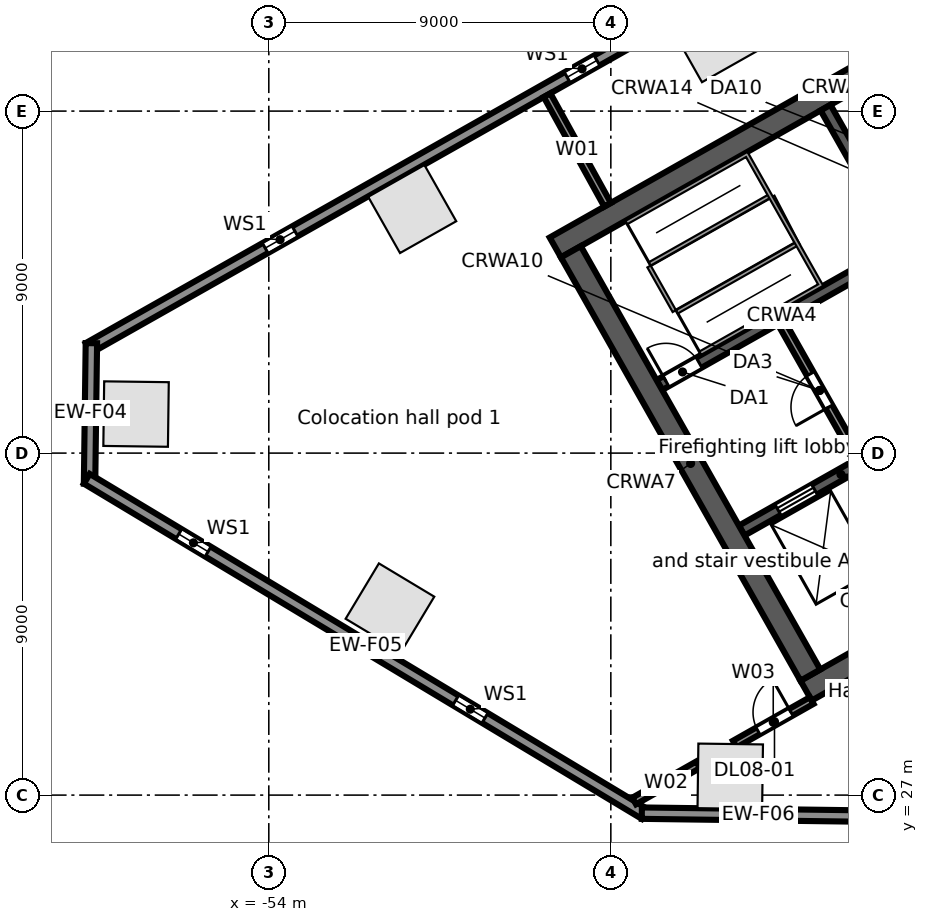
"""IFC4 building model, lengths in metres.
Left out: names, types, materials, properties, quantities, classifications, styles, units other than length and angle.
Written with IfcOpenShell. Run it as: python <this file> out.ifc"""

import sys

from ifc_helpers import new_model, si_unit, direction, frame, frame_2d, origin, origin_2d, place, context, subcontext, project, spatial, rectangle, extrude, element, fill, save


model = new_model("IFC4")
c1 = context("Model", 3, precision=1e-05, world=origin(), true_north=direction((0.0, 1.0)))
c2 = subcontext(c1, "Body", "Model", "MODEL_VIEW")
j1 = project(units=[si_unit("LENGTHUNIT", "METRE"), si_unit("PLANEANGLEUNIT", "RADIAN")], contexts=[c1])
p1 = place(None, origin())
s1 = spatial("IfcSite", under=j1, at=p1, CompositionType="ELEMENT")
p2 = place(p1, origin())
s2 = spatial("IfcBuilding", under=s1, at=p2, CompositionType="ELEMENT")
p3 = place(p2, frame((0.0, 0.0, 51.5)))
s3 = spatial("IfcBuildingStorey", under=s2, at=p3, CompositionType="ELEMENT", Elevation=51.5)
for number, where, z_axis, x_axis in (
    (1, (-42.28, 46.919, 0.0), (0.0, 0.0, 1.0), (-0.87, -0.492, 0.0)),
    (2, (-50.226, 42.423, 0.0), (0.0, 0.0, 1.0), (-0.87, -0.492, 0.0)),
    (3, (-57.493, 37.027, 0.0), (0.0, 0.0, 1.0), (-0.013, -1.0, 0.0)),
    (4, (-50.812, 31.931, 0.0), (0.0, 0.0, 1.0), (0.857, -0.515, 0.0)),
    (5, (-41.858, 27.495, 0.0), (0.0, 0.0, 1.0), (1.0, -0.013, 0.0)),
):
    element("IfcColumn", number, at=place(p3, frame(where, z_axis=z_axis, x_axis=x_axis)), inside=s3, PredefinedType="COLUMN", context=c2, shape_type="SweptSolid", body=[
        extrude(rectangle(XDim=1.7, YDim=1.7, at=origin_2d()), origin(), (0.0, 0.0, 1.0), 5.0),
    ])
p4 = place(p3, frame((-58.745, 38.764, 0.0), z_axis=(0.0, 0.0, 1.0), x_axis=(0.870355811726, 0.492423355453, 0.0)))
e6 = element("IfcWall", 6, at=p4, inside=s3, PredefinedType="STANDARD", context=c2, shape_type="SweptSolid", body=[
    extrude(rectangle(XDim=64.025, YDim=0.3, at=frame_2d((32.013, 0.0))), origin(), (0.0, 0.0, 1.0), 4.68),
])
p5 = place(p4, frame((60.122, 0.0, 0.6)))
e7 = element("IfcOpeningElement", 7, at=p5, cuts=e6, PredefinedType="OPENING", context=c2, shape_type="SweptSolid", body=[
    extrude(rectangle(XDim=0.9, YDim=3.2, at=frame_2d((0.45, 1.6))), frame((0.0, 0.16, 0.0), z_axis=(0.0, -1.0, 0.0), x_axis=(1.0, 0.0, 0.0)), (0.0, 0.0, 1.0), 0.32),
])
p6 = place(p4, frame((50.992, 0.0, 0.6)))
e8 = element("IfcOpeningElement", 8, at=p6, cuts=e6, PredefinedType="OPENING", context=c2, shape_type="SweptSolid", body=[
    extrude(rectangle(XDim=0.9, YDim=3.2, at=frame_2d((0.45, 1.6))), frame((0.0, 0.16, 0.0), z_axis=(0.0, -1.0, 0.0), x_axis=(1.0, 0.0, 0.0)), (0.0, 0.0, 1.0), 0.32),
])
p7 = place(p4, frame((41.862, 0.0, 0.6)))
e9 = element("IfcOpeningElement", 9, at=p7, cuts=e6, PredefinedType="OPENING", context=c2, shape_type="SweptSolid", body=[
    extrude(rectangle(XDim=0.9, YDim=3.2, at=frame_2d((0.45, 1.6))), frame((0.0, 0.16, 0.0), z_axis=(0.0, -1.0, 0.0), x_axis=(1.0, 0.0, 0.0)), (0.0, 0.0, 1.0), 0.32),
])
p8 = place(p4, frame((32.732, 0.0, 0.6)))
e10 = element("IfcOpeningElement", 10, at=p8, cuts=e6, PredefinedType="OPENING", context=c2, shape_type="SweptSolid", body=[
    extrude(rectangle(XDim=0.9, YDim=3.2, at=frame_2d((0.45, 1.6))), frame((0.0, 0.16, 0.0), z_axis=(0.0, -1.0, 0.0), x_axis=(1.0, 0.0, 0.0)), (0.0, 0.0, 1.0), 0.32),
])
p9 = place(p4, frame((23.602, 0.0, 0.6)))
e11 = element("IfcOpeningElement", 11, at=p9, cuts=e6, PredefinedType="OPENING", context=c2, shape_type="SweptSolid", body=[
    extrude(rectangle(XDim=0.9, YDim=3.2, at=frame_2d((0.45, 1.6))), frame((0.0, 0.16, 0.0), z_axis=(0.0, -1.0, 0.0), x_axis=(1.0, 0.0, 0.0)), (0.0, 0.0, 1.0), 0.32),
])
p10 = place(p4, frame((14.472, 0.0, 0.6)))
e12 = element("IfcOpeningElement", 12, at=p10, cuts=e6, PredefinedType="OPENING", context=c2, shape_type="SweptSolid", body=[
    extrude(rectangle(XDim=0.9, YDim=3.2, at=frame_2d((0.45, 1.6))), frame((0.0, 0.16, 0.0), z_axis=(0.0, -1.0, 0.0), x_axis=(1.0, 0.0, 0.0)), (0.0, 0.0, 1.0), 0.32),
])
p11 = place(p4, frame((5.342, 0.0, 0.6)))
e13 = element("IfcOpeningElement", 13, at=p11, cuts=e6, PredefinedType="OPENING", context=c2, shape_type="SweptSolid", body=[
    extrude(rectangle(XDim=0.9, YDim=3.2, at=frame_2d((0.45, 1.6))), frame((0.0, 0.16, 0.0), z_axis=(0.0, -1.0, 0.0), x_axis=(1.0, 0.0, 0.0)), (0.0, 0.0, 1.0), 0.32),
])
p12 = place(p3, frame((-58.717, 35.194, 0.0), z_axis=(0.0, 0.0, 1.0), x_axis=(0.013069053407, 0.999914596275, 0.0)))
e14 = element("IfcWall", 14, at=p12, inside=s3, PredefinedType="STANDARD", context=c2, shape_type="SweptSolid", body=[
    extrude(rectangle(XDim=3.699, YDim=0.3, at=frame_2d((1.849, 0.0))), origin(), (0.0, 0.0, 1.0), 4.68),
])
p13 = place(p3, frame((-44.109, 26.504, 0.0), z_axis=(0.0, 0.0, 1.0), x_axis=(-0.857169502585, 0.515034410344, 0.0)))
e15 = element("IfcWall", 15, at=p13, inside=s3, PredefinedType="STANDARD", context=c2, shape_type="SweptSolid", body=[
    extrude(rectangle(XDim=17.127, YDim=0.3, at=frame_2d((8.563, 0.0))), origin(), (0.0, 0.0, 1.0), 4.68),
])
p14 = place(p13, frame((13.403, 0.0, 0.6)))
e16 = element("IfcOpeningElement", 16, at=p14, cuts=e15, PredefinedType="OPENING", context=c2, shape_type="SweptSolid", body=[
    extrude(rectangle(XDim=0.9, YDim=3.2, at=frame_2d((0.45, 1.6))), frame((0.0, 0.16, 0.0), z_axis=(0.0, -1.0, 0.0), x_axis=(1.0, 0.0, 0.0)), (0.0, 0.0, 1.0), 0.32),
])
p15 = place(p13, frame((4.903, 0.0, 0.6)))
e17 = element("IfcOpeningElement", 17, at=p15, cuts=e15, PredefinedType="OPENING", context=c2, shape_type="SweptSolid", body=[
    extrude(rectangle(XDim=0.9, YDim=3.2, at=frame_2d((0.45, 1.6))), frame((0.0, 0.16, 0.0), z_axis=(0.0, -1.0, 0.0), x_axis=(1.0, 0.0, 0.0)), (0.0, 0.0, 1.0), 0.32),
])
p16 = place(p3, frame((-38.057, 26.445, 0.0), z_axis=(0.0, 0.0, 1.0), x_axis=(-0.999914086342, 0.013108010296, 0.0)))
e18 = element("IfcWall", 18, at=p16, inside=s3, PredefinedType="STANDARD", context=c2, shape_type="SweptSolid", body=[
    extrude(rectangle(XDim=6.128, YDim=0.3, at=frame_2d((3.064, 0.0))), origin(), (0.0, 0.0, 1.0), 4.68),
])
p17 = place(p3, frame((-39.862, 29.749, 0.0), z_axis=(0.0, 0.0, 1.0), x_axis=(0.870350116061, 0.492433422375, 0.0)))
e19 = element("IfcWall", 19, at=p17, inside=s3, PredefinedType="SOLIDWALL", context=c2, shape_type="SweptSolid", body=[
    extrude(rectangle(XDim=17.0, YDim=0.6, at=frame_2d((8.5, 0.0))), origin(), (0.0, 0.0, 1.0), 4.68),
])
p18 = place(p17, frame((7.2, 0.0, 0.0)))
e20 = element("IfcOpeningElement", 20, at=p18, cuts=e19, PredefinedType="OPENING", context=c2, shape_type="SweptSolid", body=[
    extrude(rectangle(XDim=1.2, YDim=2.1, at=frame_2d((0.6, 1.05))), frame((0.0, 0.31, 0.0), z_axis=(0.0, -1.0, 0.0), x_axis=(1.0, 0.0, 0.0)), (0.0, 0.0, 1.0), 0.62),
])
p19 = place(p3, frame((-41.556, 33.961, 0.0), z_axis=(0.0, 0.0, 1.0), x_axis=(0.870343731308, 0.492444706919, 0.0)))
e21 = element("IfcWall", 21, at=p19, inside=s3, PredefinedType="SOLIDWALL", context=c2, shape_type="SweptSolid", body=[
    extrude(rectangle(XDim=6.0, YDim=0.3, at=frame_2d((3.0, 0.0))), origin(), (0.0, 0.0, 1.0), 4.68),
])
p20 = place(p19, frame((1.1, 0.0, 0.0)))
e22 = element("IfcOpeningElement", 22, at=p20, cuts=e21, PredefinedType="OPENING", context=c2, shape_type="SweptSolid", body=[
    extrude(rectangle(XDim=1.1, YDim=2.1, at=frame_2d((0.55, 1.05))), frame((0.0, 0.16, 0.0), z_axis=(0.0, -1.0, 0.0), x_axis=(1.0, 0.0, 0.0)), (0.0, 0.0, 1.0), 0.32),
])
p21 = place(p19, frame((4.25, 0.0, 0.0)))
e23 = element("IfcOpeningElement", 23, at=p21, cuts=e21, PredefinedType="OPENING", context=c2, shape_type="SweptSolid", body=[
    extrude(rectangle(XDim=1.1, YDim=2.1, at=frame_2d((0.55, 1.05))), frame((0.0, 0.16, 0.0), z_axis=(0.0, -1.0, 0.0), x_axis=(1.0, 0.0, 0.0)), (0.0, 0.0, 1.0), 0.32),
])
p22 = place(p3, frame((-43.723, 37.791, 0.0), z_axis=(0.0, 0.0, 1.0), x_axis=(0.87035077051, 0.49243226567, 0.0)))
e24 = element("IfcWall", 24, at=p22, inside=s3, PredefinedType="SOLIDWALL", context=c2, shape_type="SweptSolid", body=[
    extrude(rectangle(XDim=7.4, YDim=0.3, at=frame_2d((3.7, 0.0))), origin(), (0.0, 0.0, 1.0), 4.68),
])
p23 = place(p22, frame((0.2, 0.0, 0.0)))
e25 = element("IfcOpeningElement", 25, at=p23, cuts=e24, PredefinedType="OPENING", context=c2, shape_type="SweptSolid", body=[
    extrude(rectangle(XDim=1.0, YDim=2.1, at=frame_2d((0.5, 1.05))), frame((0.0, 0.16, 0.0), z_axis=(0.0, -1.0, 0.0), x_axis=(1.0, 0.0, 0.0)), (0.0, 0.0, 1.0), 0.32),
])
p24 = place(p3, frame((-46.461, 41.412, 0.0), z_axis=(0.0, 0.0, 1.0), x_axis=(0.870350116061, 0.492433422375, 0.0)))
e26 = element("IfcWall", 26, at=p24, inside=s3, PredefinedType="SOLIDWALL", context=c2, shape_type="SweptSolid", body=[
    extrude(rectangle(XDim=17.0, YDim=0.6, at=frame_2d((8.5, 0.0))), origin(), (0.0, 0.0, 1.0), 4.68),
])
p25 = place(p3, frame((-46.052, 41.298, 0.0), z_axis=(0.0, 0.0, 1.0), x_axis=(0.492418598281, -0.870358503186, 0.0)))
e27 = element("IfcWall", 27, at=p25, inside=s3, PredefinedType="SOLIDWALL", context=c2, shape_type="SweptSolid", body=[
    extrude(rectangle(XDim=12.8, YDim=0.6, at=frame_2d((6.4, 0.0))), origin(), (0.0, 0.0, 1.0), 4.68),
])
p26 = place(p3, frame((-40.516, 39.433, 0.0), z_axis=(0.0, 0.0, 1.0), x_axis=(0.492453559952, -0.87033872216, 0.0)))
e28 = element("IfcWall", 28, at=p26, inside=s3, PredefinedType="PARTITIONING", context=c2, shape_type="SweptSolid", body=[
    extrude(rectangle(XDim=4.1, YDim=0.2, at=frame_2d((2.05, 0.0))), origin(), (0.0, 0.0, 1.0), 4.68),
])
p27 = place(p26, frame((1.55, 0.0, 0.0)))
e29 = element("IfcOpeningElement", 29, at=p27, cuts=e28, PredefinedType="OPENING", context=c2, shape_type="SweptSolid", body=[
    extrude(rectangle(XDim=1.0, YDim=2.1, at=frame_2d((0.5, 1.05))), frame((0.0, 0.11, 0.0), z_axis=(0.0, -1.0, 0.0), x_axis=(1.0, 0.0, 0.0)), (0.0, 0.0, 1.0), 0.22),
])
p28 = place(p3, frame((-39.35, 45.09, 0.0), z_axis=(0.0, 0.0, 1.0), x_axis=(0.49241474071, -0.870360685654, 0.0)))
e30 = element("IfcWall", 30, at=p28, inside=s3, PredefinedType="SOLIDWALL", context=c2, shape_type="SweptSolid", body=[
    extrude(rectangle(XDim=4.05, YDim=0.3, at=frame_2d((2.025, 0.0))), origin(), (0.0, 0.0, 1.0), 4.68),
])
p29 = place(p3, frame((-46.678, 45.419, 0.0), z_axis=(0.0, 0.0, 1.0), x_axis=(0.483275206546, -0.875468488718, 0.0)))
e31 = element("IfcWall", 31, at=p29, inside=s3, PredefinedType="PARTITIONING", context=c2, shape_type="SweptSolid", body=[
    extrude(rectangle(XDim=3.294, YDim=0.2, at=frame_2d((1.647, 0.0))), origin(), (0.0, 0.0, 1.0), 3.96),
])
p30 = place(p3, frame((-44.386, 26.845, 0.0), z_axis=(0.0, 0.0, 1.0), x_axis=(0.870226201187, 0.492652371118, 0.0)))
e32 = element("IfcWall", 32, at=p30, inside=s3, PredefinedType="PARTITIONING", context=c2, shape_type="SweptSolid", body=[
    extrude(rectangle(XDim=1.933, YDim=0.2, at=frame_2d((0.966, 0.0))), origin(), (0.0, 0.0, 1.0), 4.68),
])
p31 = place(p3, frame((-41.738, 28.343, 0.0), z_axis=(0.0, 0.0, 1.0), x_axis=(0.870265350095, 0.492583211676, 0.0)))
e33 = element("IfcWall", 33, at=p31, inside=s3, PredefinedType="PARTITIONING", context=c2, shape_type="SweptSolid", body=[
    extrude(rectangle(XDim=2.324, YDim=0.2, at=frame_2d((1.162, 0.0))), origin(), (0.0, 0.0, 1.0), 4.68),
])
p32 = place(p31, frame((0.7, 0.0, 0.0)))
e34 = element("IfcOpeningElement", 34, at=p32, cuts=e33, PredefinedType="OPENING", context=c2, shape_type="SweptSolid", body=[
    extrude(rectangle(XDim=1.0, YDim=2.1, at=frame_2d((0.5, 1.05))), frame((0.0, 0.11, 0.0), z_axis=(0.0, -1.0, 0.0), x_axis=(1.0, 0.0, 0.0)), (0.0, 0.0, 1.0), 0.22),
])
p33 = place(p10, origin())
e35 = element("IfcWindow", 35, at=p33, inside=s3, PartitioningType="SINGLE_PANEL", PredefinedType="WINDOW", context=c2, shape_type="SweptSolid", body=[
    extrude(rectangle(XDim=0.9, YDim=3.2, at=frame_2d((0.45, 1.6))), frame((0.0, 0.03, 0.0), z_axis=(0.0, -1.0, 0.0), x_axis=(1.0, 0.0, 0.0)), (0.0, 0.0, 1.0), 0.06),
])
fill(e12, e35)
p34 = place(p11, origin())
e36 = element("IfcWindow", 36, at=p34, inside=s3, PartitioningType="SINGLE_PANEL", PredefinedType="WINDOW", context=c2, shape_type="SweptSolid", body=[
    extrude(rectangle(XDim=0.9, YDim=3.2, at=frame_2d((0.45, 1.6))), frame((0.0, 0.03, 0.0), z_axis=(0.0, -1.0, 0.0), x_axis=(1.0, 0.0, 0.0)), (0.0, 0.0, 1.0), 0.06),
])
fill(e13, e36)
p35 = place(p14, origin())
e37 = element("IfcWindow", 37, at=p35, inside=s3, PartitioningType="SINGLE_PANEL", PredefinedType="WINDOW", context=c2, shape_type="SweptSolid", body=[
    extrude(rectangle(XDim=0.9, YDim=3.2, at=frame_2d((0.45, 1.6))), frame((0.0, 0.03, 0.0), z_axis=(0.0, -1.0, 0.0), x_axis=(1.0, 0.0, 0.0)), (0.0, 0.0, 1.0), 0.06),
])
fill(e16, e37)
p36 = place(p15, origin())
e38 = element("IfcWindow", 38, at=p36, inside=s3, PartitioningType="SINGLE_PANEL", PredefinedType="WINDOW", context=c2, shape_type="SweptSolid", body=[
    extrude(rectangle(XDim=0.9, YDim=3.2, at=frame_2d((0.45, 1.6))), frame((0.0, 0.03, 0.0), z_axis=(0.0, -1.0, 0.0), x_axis=(1.0, 0.0, 0.0)), (0.0, 0.0, 1.0), 0.06),
])
fill(e17, e38)
p37 = place(p20, origin())
e39 = element("IfcDoor", 39, at=p37, inside=s3, OperationType="DOUBLE_DOOR_SLIDING", PredefinedType="DOOR", context=c2, shape_type="SweptSolid", body=[
    extrude(rectangle(XDim=1.1, YDim=2.1, at=frame_2d((0.55, 1.05))), frame((0.0, 0.025, 0.0), z_axis=(0.0, -1.0, 0.0), x_axis=(1.0, 0.0, 0.0)), (0.0, 0.0, 1.0), 0.05),
])
fill(e22, e39)
p38 = place(p23, origin())
e40 = element("IfcDoor", 40, at=p38, inside=s3, OperationType="SINGLE_SWING_LEFT", PredefinedType="DOOR", context=c2, shape_type="SweptSolid", body=[
    extrude(rectangle(XDim=1.0, YDim=2.1, at=frame_2d((0.5, 1.05))), frame((0.0, 0.025, 0.0), z_axis=(0.0, -1.0, 0.0), x_axis=(1.0, 0.0, 0.0)), (0.0, 0.0, 1.0), 0.05),
])
fill(e25, e40)
p39 = place(p27, frame((1.0, 0.0, 0.0), z_axis=(0.0, 0.0, 1.0), x_axis=(-1.0, 0.0, 0.0)))
e41 = element("IfcDoor", 41, at=p39, inside=s3, OperationType="SINGLE_SWING_LEFT", PredefinedType="DOOR", context=c2, shape_type="SweptSolid", body=[
    extrude(rectangle(XDim=1.0, YDim=2.1, at=frame_2d((0.5, 1.05))), frame((0.0, 0.025, 0.0), z_axis=(0.0, -1.0, 0.0), x_axis=(1.0, 0.0, 0.0)), (0.0, 0.0, 1.0), 0.05),
])
fill(e29, e41)
p40 = place(p32, origin())
e42 = element("IfcDoor", 42, at=p40, inside=s3, OperationType="SINGLE_SWING_RIGHT", PredefinedType="DOOR", context=c2, shape_type="SweptSolid", body=[
    extrude(rectangle(XDim=1.0, YDim=2.1, at=frame_2d((0.5, 1.05))), frame((0.0, 0.025, 0.0), z_axis=(0.0, -1.0, 0.0), x_axis=(1.0, 0.0, 0.0)), (0.0, 0.0, 1.0), 0.05),
])
fill(e34, e42)
save(model, sys.argv[1])
